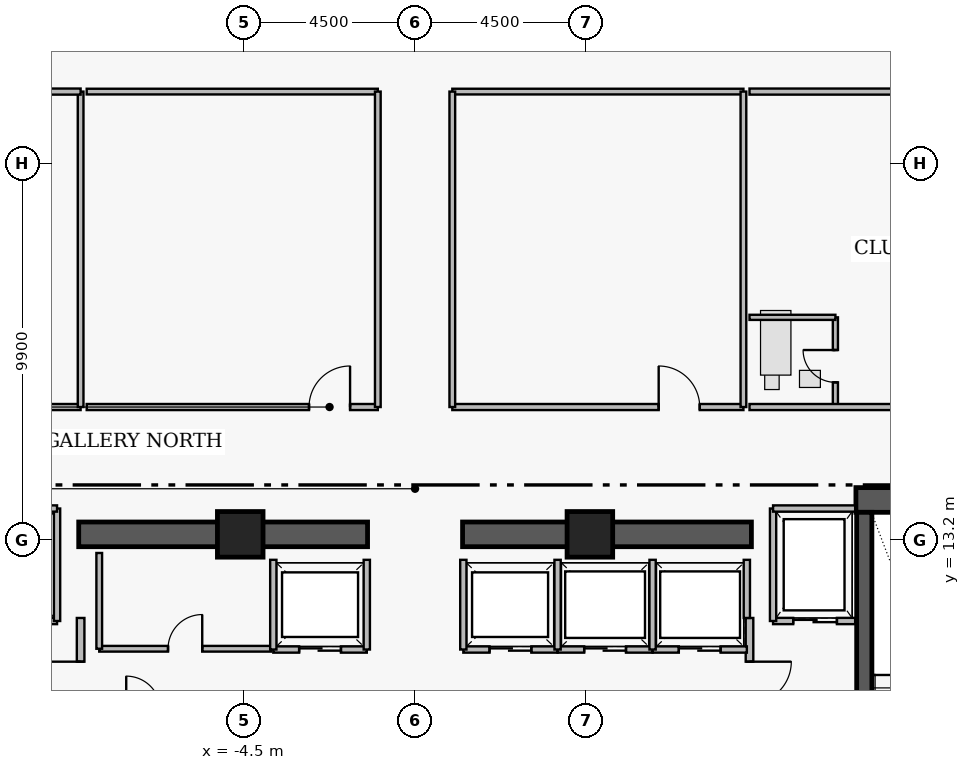
"""IFC4 building model, lengths in metres.
Left out: names, types, materials, properties, quantities, classifications, styles, units other than length and angle.
Written with IfcOpenShell. Run it as: python <this file> out.ifc"""

import sys

from ifc_helpers import new_model, si_unit, direction, frame, frame_2d, origin, origin_2d, place, context, subcontext, project, spatial, rectangle, extrude, element, fill, save


model = new_model("IFC4")
c1 = context("Model", 3, precision=1e-05, world=origin(), true_north=direction((0.0, 1.0)))
c2 = subcontext(c1, "Body", "Model", "MODEL_VIEW")
j1 = project(units=[si_unit("LENGTHUNIT", "METRE"), si_unit("PLANEANGLEUNIT", "RADIAN")], contexts=[c1])
p1 = place(None, origin())
s1 = spatial("IfcSite", under=j1, at=p1, CompositionType="ELEMENT")
p2 = place(p1, origin())
s2 = spatial("IfcBuilding", under=s1, at=p2, CompositionType="ELEMENT")
p3 = place(p2, frame((0.0, 0.0, 226.15)))
s3 = spatial("IfcBuildingStorey", under=s2, at=p3, CompositionType="ELEMENT", Elevation=226.15)
p4 = place(p3, frame((11.6, 14.255, 0.0), z_axis=(0.0, 0.0, 1.0), x_axis=(1.0, 0.0, 0.0)))
e1 = element("IfcWall", 1, at=p4, inside=s3, PredefinedType="SHEAR", context=c2, shape_type="SweptSolid", body=[
    extrude(rectangle(XDim=4.46, YDim=0.65, at=frame_2d((2.23, 0.0))), origin(), (0.0, 0.0, 1.0), 3.56),
])
for number, where, z_axis, x_axis in (
    (2, (-8.85, 13.35, 0.0), (0.0, 0.0, 1.0), (1.0, 0.0, 0.0)),
    (3, (1.25, 13.35, 0.0), (0.0, 0.0, 1.0), (1.0, 0.0, 0.0)),
):
    element("IfcWall", number, at=place(p3, frame(where, z_axis=z_axis, x_axis=x_axis)), inside=s3, PredefinedType="SHEAR", context=c2, shape_type="SweptSolid", body=[
        extrude(rectangle(XDim=7.6, YDim=0.65, at=frame_2d((3.8, 0.0))), origin(), (0.0, 0.0, 1.0), 3.53),
    ])
p5 = place(p3, frame((11.82, 13.93, 0.0), z_axis=(0.0, 0.0, 1.0), x_axis=(0.0, -1.0, 0.0)))
e4 = element("IfcWall", 4, at=p5, inside=s3, PredefinedType="SHEAR", context=c2, shape_type="SweptSolid", body=[
    extrude(rectangle(XDim=8.96, YDim=0.4, at=frame_2d((4.48, 0.0))), origin(), (0.0, 0.0, 1.0), 3.56),
])
p6 = place(p5, frame((7.53, 0.0, 0.0)))
e5 = element("IfcOpeningElement", 5, at=p6, cuts=e4, PredefinedType="OPENING", context=c2, shape_type="SweptSolid", body=[
    extrude(rectangle(XDim=1.12, YDim=2.22, at=frame_2d((0.56, 1.11))), frame((0.0, 0.21, 0.0), z_axis=(0.0, -1.0, 0.0), x_axis=(1.0, 0.0, 0.0)), (0.0, 0.0, 1.0), 0.42),
])
for number, where, z_axis, x_axis in (
    (6, (-4.6, 13.35, 0.0), (0.0, 0.0, 1.0), (1.0, 0.0, 0.0)),
    (7, (4.6, 13.35, 0.0), (0.0, 0.0, 1.0), (1.0, 0.0, 0.0)),
):
    element("IfcColumn", number, at=place(p3, frame(where, z_axis=z_axis, x_axis=x_axis)), inside=s3, PredefinedType="COLUMN", context=c2, shape_type="SweptSolid", body=[
        extrude(rectangle(XDim=1.2, YDim=1.2, at=origin_2d()), origin(), (0.0, 0.0, 1.0), 3.75),
    ])
p7 = place(p3, frame((-8.8, 5.05, 0.0), z_axis=(0.0, 0.0, 1.0), x_axis=(0.0, 1.0, 0.0)))
e8 = element("IfcWall", 8, at=p7, inside=s3, PredefinedType="PARTITIONING", context=c2, shape_type="SweptSolid", body=[
    extrude(rectangle(XDim=6.1, YDim=0.2, at=frame_2d((3.05, 0.0))), origin(), (0.0, 0.0, 1.0), 3.53),
])
p8 = place(p7, frame((0.25, 0.0, 0.0)))
e9 = element("IfcOpeningElement", 9, at=p8, cuts=e8, PredefinedType="OPENING", context=c2, shape_type="SweptSolid", body=[
    extrude(rectangle(XDim=1.1, YDim=2.2, at=frame_2d((0.55, 1.1))), frame((0.0, 0.11, 0.0), z_axis=(0.0, -1.0, 0.0), x_axis=(1.0, 0.0, 0.0)), (0.0, 0.0, 1.0), 0.22),
])
p9 = place(p7, frame((3.85, 0.0, 0.0)))
e10 = element("IfcOpeningElement", 10, at=p9, cuts=e8, PredefinedType="OPENING", context=c2, shape_type="SweptSolid", body=[
    extrude(rectangle(XDim=1.1, YDim=2.2, at=frame_2d((0.55, 1.1))), frame((0.0, 0.11, 0.0), z_axis=(0.0, -1.0, 0.0), x_axis=(1.0, 0.0, 0.0)), (0.0, 0.0, 1.0), 0.22),
])
p10 = place(p3, frame((8.8, 11.15, 0.0), z_axis=(0.0, 0.0, 1.0), x_axis=(0.0, -1.0, 0.0)))
e11 = element("IfcWall", 11, at=p10, inside=s3, PredefinedType="PARTITIONING", context=c2, shape_type="SweptSolid", body=[
    extrude(rectangle(XDim=6.1, YDim=0.2, at=frame_2d((3.05, 0.0))), origin(), (0.0, 0.0, 1.0), 3.53),
])
p11 = place(p10, frame((1.15, 0.0, 0.0)))
e12 = element("IfcOpeningElement", 12, at=p11, cuts=e11, PredefinedType="OPENING", context=c2, shape_type="SweptSolid", body=[
    extrude(rectangle(XDim=1.1, YDim=2.2, at=frame_2d((0.55, 1.1))), frame((0.0, 0.11, 0.0), z_axis=(0.0, -1.0, 0.0), x_axis=(1.0, 0.0, 0.0)), (0.0, 0.0, 1.0), 0.22),
])
p12 = place(p10, frame((4.75, 0.0, 0.0)))
e13 = element("IfcOpeningElement", 13, at=p12, cuts=e11, PredefinedType="OPENING", context=c2, shape_type="SweptSolid", body=[
    extrude(rectangle(XDim=1.1, YDim=2.2, at=frame_2d((0.55, 1.1))), frame((0.0, 0.11, 0.0), z_axis=(0.0, -1.0, 0.0), x_axis=(1.0, 0.0, 0.0)), (0.0, 0.0, 1.0), 0.22),
])
p13 = place(p3, frame((-11.58, 11.07, 0.0), z_axis=(0.0, 0.0, 1.0), x_axis=(1.0, 0.0, 0.0)))
e14 = element("IfcWall", 14, at=p13, inside=s3, PredefinedType="PARTITIONING", context=c2, shape_type="SweptSolid", body=[
    extrude(rectangle(XDim=2.16, YDim=0.165, at=frame_2d((1.08, 0.0))), origin(), (0.0, 0.0, 1.0), 3.53),
])
p14 = place(p13, frame((0.53, 0.0, 0.0)))
e15 = element("IfcOpeningElement", 15, at=p14, cuts=e14, PredefinedType="OPENING", context=c2, shape_type="SweptSolid", body=[
    extrude(rectangle(XDim=1.15, YDim=2.25, at=frame_2d((0.575, 1.125))), frame((0.0, 0.093, 0.0), z_axis=(0.0, -1.0, 0.0), x_axis=(1.0, 0.0, 0.0)), (0.0, 0.0, 1.0), 0.185),
])
p15 = place(p3, frame((9.42, 11.07, 0.0), z_axis=(0.0, 0.0, 1.0), x_axis=(1.0, 0.0, 0.0)))
e16 = element("IfcWall", 16, at=p15, inside=s3, PredefinedType="PARTITIONING", context=c2, shape_type="SweptSolid", body=[
    extrude(rectangle(XDim=2.16, YDim=0.165, at=frame_2d((1.08, 0.0))), origin(), (0.0, 0.0, 1.0), 3.53),
])
p16 = place(p15, frame((0.53, 0.0, 0.0)))
e17 = element("IfcOpeningElement", 17, at=p16, cuts=e16, PredefinedType="OPENING", context=c2, shape_type="SweptSolid", body=[
    extrude(rectangle(XDim=1.15, YDim=2.25, at=frame_2d((0.575, 1.125))), frame((0.0, 0.093, 0.0), z_axis=(0.0, -1.0, 0.0), x_axis=(1.0, 0.0, 0.0)), (0.0, 0.0, 1.0), 0.185),
])
p17 = place(p3, frame((-3.73, 10.32, 0.0), z_axis=(0.0, 0.0, 1.0), x_axis=(1.0, 0.0, 0.0)))
e18 = element("IfcWall", 18, at=p17, inside=s3, PredefinedType="PARTITIONING", context=c2, shape_type="SweptSolid", body=[
    extrude(rectangle(XDim=2.46, YDim=0.165, at=frame_2d((1.23, 0.0))), origin(), (0.0, 0.0, 1.0), 3.53),
])
p18 = place(p17, frame((0.68, 0.0, 0.0)))
e19 = element("IfcOpeningElement", 19, at=p18, cuts=e18, PredefinedType="OPENING", context=c2, shape_type="SweptSolid", body=[
    extrude(rectangle(XDim=1.1, YDim=2.25, at=frame_2d((0.55, 1.125))), frame((0.0, 0.093, 0.0), z_axis=(0.0, -1.0, 0.0), x_axis=(1.0, 0.0, 0.0)), (0.0, 0.0, 1.0), 0.185),
])
p19 = place(p3, frame((1.27, 10.32, 0.0), z_axis=(0.0, 0.0, 1.0), x_axis=(1.0, 0.0, 0.0)))
e20 = element("IfcWall", 20, at=p19, inside=s3, PredefinedType="PARTITIONING", context=c2, shape_type="SweptSolid", body=[
    extrude(rectangle(XDim=2.48, YDim=0.165, at=frame_2d((1.24, 0.0))), origin(), (0.0, 0.0, 1.0), 3.53),
])
p20 = place(p19, frame((0.69, 0.0, 0.0)))
e21 = element("IfcOpeningElement", 21, at=p20, cuts=e20, PredefinedType="OPENING", context=c2, shape_type="SweptSolid", body=[
    extrude(rectangle(XDim=1.1, YDim=2.25, at=frame_2d((0.55, 1.125))), frame((0.0, 0.093, 0.0), z_axis=(0.0, -1.0, 0.0), x_axis=(1.0, 0.0, 0.0)), (0.0, 0.0, 1.0), 0.185),
])
p21 = place(p3, frame((3.75, 10.32, 0.0), z_axis=(0.0, 0.0, 1.0), x_axis=(1.0, 0.0, 0.0)))
e22 = element("IfcWall", 22, at=p21, inside=s3, PredefinedType="PARTITIONING", context=c2, shape_type="SweptSolid", body=[
    extrude(rectangle(XDim=2.5, YDim=0.165, at=frame_2d((1.25, 0.0))), origin(), (0.0, 0.0, 1.0), 3.53),
])
p22 = place(p21, frame((0.7, 0.0, 0.0)))
e23 = element("IfcOpeningElement", 23, at=p22, cuts=e22, PredefinedType="OPENING", context=c2, shape_type="SweptSolid", body=[
    extrude(rectangle(XDim=1.1, YDim=2.25, at=frame_2d((0.55, 1.125))), frame((0.0, 0.093, 0.0), z_axis=(0.0, -1.0, 0.0), x_axis=(1.0, 0.0, 0.0)), (0.0, 0.0, 1.0), 0.185),
])
p23 = place(p3, frame((6.25, 10.32, 0.0), z_axis=(0.0, 0.0, 1.0), x_axis=(1.0, 0.0, 0.0)))
e24 = element("IfcWall", 24, at=p23, inside=s3, PredefinedType="PARTITIONING", context=c2, shape_type="SweptSolid", body=[
    extrude(rectangle(XDim=2.48, YDim=0.165, at=frame_2d((1.24, 0.0))), origin(), (0.0, 0.0, 1.0), 3.53),
])
p24 = place(p23, frame((0.69, 0.0, 0.0)))
e25 = element("IfcOpeningElement", 25, at=p24, cuts=e24, PredefinedType="OPENING", context=c2, shape_type="SweptSolid", body=[
    extrude(rectangle(XDim=1.1, YDim=2.25, at=frame_2d((0.55, 1.125))), frame((0.0, 0.093, 0.0), z_axis=(0.0, -1.0, 0.0), x_axis=(1.0, 0.0, 0.0)), (0.0, 0.0, 1.0), 0.185),
])
p25 = place(p3, frame((-8.31, 10.34, 0.0), z_axis=(0.0, 0.0, 1.0), x_axis=(1.0, 0.0, 0.0)))
e26 = element("IfcWall", 26, at=p25, inside=s3, PredefinedType="PARTITIONING", context=c2, shape_type="SweptSolid", body=[
    extrude(rectangle(XDim=4.52, YDim=0.15, at=frame_2d((2.26, 0.0))), origin(), (0.0, 0.0, 1.0), 3.53),
])
p26 = place(p25, frame((1.81, 0.0, 0.0)))
e27 = element("IfcOpeningElement", 27, at=p26, cuts=e26, PredefinedType="OPENING", context=c2, shape_type="SweptSolid", body=[
    extrude(rectangle(XDim=0.9, YDim=2.15, at=frame_2d((0.45, 1.075))), frame((0.0, 0.085, 0.0), z_axis=(0.0, -1.0, 0.0), x_axis=(1.0, 0.0, 0.0)), (0.0, 0.0, 1.0), 0.17),
])
p27 = place(p3, frame((-22.04, 16.7, 0.0), z_axis=(0.0, 0.0, 1.0), x_axis=(1.0, 0.0, 0.0)))
e28 = element("IfcWall", 28, at=p27, inside=s3, PredefinedType="PARTITIONING", context=c2, shape_type="SweptSolid", body=[
    extrude(rectangle(XDim=13.24, YDim=0.16, at=frame_2d((6.62, 0.0))), origin(), (0.0, 0.0, 1.0), 3.124),
])
p28 = place(p27, frame((7.365, 0.0, 0.0)))
e29 = element("IfcOpeningElement", 29, at=p28, cuts=e28, PredefinedType="OPENING", context=c2, shape_type="SweptSolid", body=[
    extrude(rectangle(XDim=1.0, YDim=2.15, at=frame_2d((0.5, 1.075))), frame((0.0, 0.09, 0.0), z_axis=(0.0, -1.0, 0.0), x_axis=(1.0, 0.0, 0.0)), (0.0, 0.0, 1.0), 0.18),
])
p29 = place(p3, frame((-8.64, 16.7, 0.0), z_axis=(0.0, 0.0, 1.0), x_axis=(1.0, 0.0, 0.0)))
e30 = element("IfcWall", 30, at=p29, inside=s3, PredefinedType="PARTITIONING", context=c2, shape_type="SweptSolid", body=[
    extrude(rectangle(XDim=7.66, YDim=0.16, at=frame_2d((3.83, 0.0))), origin(), (0.0, 0.0, 1.0), 3.124),
])
p30 = place(p29, frame((5.85, 0.0, 0.0)))
e31 = element("IfcOpeningElement", 31, at=p30, cuts=e30, PredefinedType="OPENING", context=c2, shape_type="SweptSolid", body=[
    extrude(rectangle(XDim=1.08, YDim=2.18, at=frame_2d((0.54, 1.09))), frame((0.0, 0.09, 0.0), z_axis=(0.0, -1.0, 0.0), x_axis=(1.0, 0.0, 0.0)), (0.0, 0.0, 1.0), 0.18),
])
p31 = place(p3, frame((0.98, 16.7, 0.0), z_axis=(0.0, 0.0, 1.0), x_axis=(1.0, 0.0, 0.0)))
e32 = element("IfcWall", 32, at=p31, inside=s3, PredefinedType="PARTITIONING", context=c2, shape_type="SweptSolid", body=[
    extrude(rectangle(XDim=7.66, YDim=0.16, at=frame_2d((3.83, 0.0))), origin(), (0.0, 0.0, 1.0), 3.124),
])
p32 = place(p31, frame((5.43, 0.0, 0.0)))
e33 = element("IfcOpeningElement", 33, at=p32, cuts=e32, PredefinedType="OPENING", context=c2, shape_type="SweptSolid", body=[
    extrude(rectangle(XDim=1.08, YDim=2.18, at=frame_2d((0.54, 1.09))), frame((0.0, 0.09, 0.0), z_axis=(0.0, -1.0, 0.0), x_axis=(1.0, 0.0, 0.0)), (0.0, 0.0, 1.0), 0.18),
])
p33 = place(p3, frame((11.06, 16.7, 0.0), z_axis=(0.0, 0.0, 1.0), x_axis=(0.0, 1.0, 0.0)))
e34 = element("IfcWall", 34, at=p33, inside=s3, PredefinedType="PLUMBINGWALL", context=c2, shape_type="SweptSolid", body=[
    extrude(rectangle(XDim=2.36, YDim=0.135, at=frame_2d((1.18, 0.0))), origin(), (0.0, 0.0, 1.0), 3.53),
])
p34 = place(p33, frame((0.65, 0.0, 0.0)))
e35 = element("IfcOpeningElement", 35, at=p34, cuts=e34, PredefinedType="OPENING", context=c2, shape_type="SweptSolid", body=[
    extrude(rectangle(XDim=0.85, YDim=2.1, at=frame_2d((0.425, 1.05))), frame((0.0, 0.077, 0.0), z_axis=(0.0, -1.0, 0.0), x_axis=(1.0, 0.0, 0.0)), (0.0, 0.0, 1.0), 0.155),
])
p35 = place(p3, frame((8.8, 16.7, 0.0), z_axis=(0.0, 0.0, 1.0), x_axis=(1.0, 0.0, 0.0)))
e36 = element("IfcWall", 36, at=p35, inside=s3, PredefinedType="PARTITIONING", context=c2, shape_type="SweptSolid", body=[
    extrude(rectangle(XDim=13.24, YDim=0.16, at=frame_2d((6.62, 0.0))), origin(), (0.0, 0.0, 1.0), 3.124),
])
p36 = place(p35, frame((6.025, 0.0, 0.0)))
e37 = element("IfcOpeningElement", 37, at=p36, cuts=e36, PredefinedType="OPENING", context=c2, shape_type="SweptSolid", body=[
    extrude(rectangle(XDim=1.0, YDim=2.15, at=frame_2d((0.5, 1.075))), frame((0.0, 0.09, 0.0), z_axis=(0.0, -1.0, 0.0), x_axis=(1.0, 0.0, 0.0)), (0.0, 0.0, 1.0), 0.18),
])
p37 = place(p3, frame((-9.42, 11.07, 0.0), z_axis=(0.0, 0.0, 1.0), x_axis=(0.0, 1.0, 0.0)))
e38 = element("IfcWall", 38, at=p37, inside=s3, PredefinedType="PARTITIONING", context=c2, shape_type="SweptSolid", body=[
    extrude(rectangle(XDim=2.96, YDim=0.165, at=frame_2d((1.48, 0.0))), origin(), (0.0, 0.0, 1.0), 3.53),
])
p38 = place(p3, frame((-11.58, 14.03, 0.0), z_axis=(0.0, 0.0, 1.0), x_axis=(1.0, 0.0, 0.0)))
e39 = element("IfcWall", 39, at=p38, inside=s3, PredefinedType="PARTITIONING", context=c2, shape_type="SweptSolid", body=[
    extrude(rectangle(XDim=2.16, YDim=0.165, at=frame_2d((1.08, 0.0))), origin(), (0.0, 0.0, 1.0), 3.53),
])
p39 = place(p3, frame((9.42, 11.07, 0.0), z_axis=(0.0, 0.0, 1.0), x_axis=(0.0, 1.0, 0.0)))
e40 = element("IfcWall", 40, at=p39, inside=s3, PredefinedType="PARTITIONING", context=c2, shape_type="SweptSolid", body=[
    extrude(rectangle(XDim=2.96, YDim=0.165, at=frame_2d((1.48, 0.0))), origin(), (0.0, 0.0, 1.0), 3.53),
])
p40 = place(p3, frame((9.42, 14.03, 0.0), z_axis=(0.0, 0.0, 1.0), x_axis=(1.0, 0.0, 0.0)))
e41 = element("IfcWall", 41, at=p40, inside=s3, PredefinedType="PARTITIONING", context=c2, shape_type="SweptSolid", body=[
    extrude(rectangle(XDim=2.16, YDim=0.165, at=frame_2d((1.08, 0.0))), origin(), (0.0, 0.0, 1.0), 3.53),
])
for number, where, z_axis, x_axis in (
    (42, (-3.73, 10.32, 0.0), (0.0, 0.0, 1.0), (0.0, 1.0, 0.0)),
    (43, (-1.27, 10.32, 0.0), (0.0, 0.0, 1.0), (0.0, 1.0, 0.0)),
    (44, (1.27, 10.32, 0.0), (0.0, 0.0, 1.0), (0.0, 1.0, 0.0)),
    (45, (3.75, 10.32, 0.0), (0.0, 0.0, 1.0), (0.0, 1.0, 0.0)),
    (46, (6.25, 10.32, 0.0), (0.0, 0.0, 1.0), (0.0, 1.0, 0.0)),
):
    element("IfcWall", number, at=place(p3, frame(where, z_axis=z_axis, x_axis=x_axis)), inside=s3, PredefinedType="PARTITIONING", context=c2, shape_type="SweptSolid", body=[
        extrude(rectangle(XDim=2.36, YDim=0.165, at=frame_2d((1.18, 0.0))), origin(), (0.0, 0.0, 1.0), 3.53),
    ])
p41 = place(p3, frame((8.73, 11.15, 0.0), z_axis=(0.0, 0.0, 1.0), x_axis=(0.0, 1.0, 0.0)))
e47 = element("IfcWall", 47, at=p41, inside=s3, PredefinedType="PARTITIONING", context=c2, shape_type="SweptSolid", body=[
    extrude(rectangle(XDim=1.53, YDim=0.165, at=frame_2d((0.765, 0.0))), origin(), (0.0, 0.0, 1.0), 3.53),
])
p42 = place(p3, frame((-8.31, 10.34, 0.0), z_axis=(0.0, 0.0, 1.0), x_axis=(0.0, 1.0, 0.0)))
e48 = element("IfcWall", 48, at=p42, inside=s3, PredefinedType="PARTITIONING", context=c2, shape_type="SweptSolid", body=[
    extrude(rectangle(XDim=2.52, YDim=0.15, at=frame_2d((1.26, 0.0))), origin(), (0.0, 0.0, 1.0), 3.53),
])
p43 = place(p3, frame((-8.8, 16.7, 0.0), z_axis=(0.0, 0.0, 1.0), x_axis=(0.0, 1.0, 0.0)))
e49 = element("IfcWall", 49, at=p43, inside=s3, PredefinedType="PARTITIONING", context=c2, shape_type="SweptSolid", body=[
    extrude(rectangle(XDim=8.3, YDim=0.15, at=frame_2d((4.15, 0.0))), origin(), (0.0, 0.0, 1.0), 3.53),
])
p44 = place(p3, frame((-22.04, 25.0, 0.0), z_axis=(0.0, 0.0, 1.0), x_axis=(1.0, 0.0, 0.0)))
e50 = element("IfcWall", 50, at=p44, inside=s3, PredefinedType="PARTITIONING", context=c2, shape_type="SweptSolid", body=[
    extrude(rectangle(XDim=13.24, YDim=0.16, at=frame_2d((6.62, 0.0))), origin(), (0.0, 0.0, 1.0), 3.124),
])
p45 = place(p3, frame((-8.64, 25.0, 0.0), z_axis=(0.0, 0.0, 1.0), x_axis=(1.0, 0.0, 0.0)))
e51 = element("IfcWall", 51, at=p45, inside=s3, PredefinedType="PARTITIONING", context=c2, shape_type="SweptSolid", body=[
    extrude(rectangle(XDim=7.66, YDim=0.15, at=frame_2d((3.83, 0.0))), origin(), (0.0, 0.0, 1.0), 3.124),
])
p46 = place(p3, frame((-0.98, 16.7, 0.0), z_axis=(0.0, 0.0, 1.0), x_axis=(0.0, 1.0, 0.0)))
e52 = element("IfcWall", 52, at=p46, inside=s3, PredefinedType="PARTITIONING", context=c2, shape_type="SweptSolid", body=[
    extrude(rectangle(XDim=8.3, YDim=0.15, at=frame_2d((4.15, 0.0))), origin(), (0.0, 0.0, 1.0), 3.53),
])
p47 = place(p3, frame((0.98, 25.0, 0.0), z_axis=(0.0, 0.0, 1.0), x_axis=(1.0, 0.0, 0.0)))
e53 = element("IfcWall", 53, at=p47, inside=s3, PredefinedType="PARTITIONING", context=c2, shape_type="SweptSolid", body=[
    extrude(rectangle(XDim=7.66, YDim=0.15, at=frame_2d((3.83, 0.0))), origin(), (0.0, 0.0, 1.0), 3.124),
])
for number, where, z_axis, x_axis in (
    (54, (0.98, 16.7, 0.0), (0.0, 0.0, 1.0), (0.0, 1.0, 0.0)),
    (55, (8.64, 16.7, 0.0), (0.0, 0.0, 1.0), (0.0, 1.0, 0.0)),
):
    element("IfcWall", number, at=place(p3, frame(where, z_axis=z_axis, x_axis=x_axis)), inside=s3, PredefinedType="PARTITIONING", context=c2, shape_type="SweptSolid", body=[
        extrude(rectangle(XDim=8.3, YDim=0.15, at=frame_2d((4.15, 0.0))), origin(), (0.0, 0.0, 1.0), 3.53),
    ])
p48 = place(p3, frame((8.8, 19.06, 0.0), z_axis=(0.0, 0.0, 1.0), x_axis=(1.0, 0.0, 0.0)))
e56 = element("IfcWall", 56, at=p48, inside=s3, PredefinedType="PLUMBINGWALL", context=c2, shape_type="SweptSolid", body=[
    extrude(rectangle(XDim=2.26, YDim=0.135, at=frame_2d((1.13, 0.0))), origin(), (0.0, 0.0, 1.0), 3.124),
])
p49 = place(p3, frame((8.8, 25.0, 0.0), z_axis=(0.0, 0.0, 1.0), x_axis=(1.0, 0.0, 0.0)))
e57 = element("IfcWall", 57, at=p49, inside=s3, PredefinedType="PARTITIONING", context=c2, shape_type="SweptSolid", body=[
    extrude(rectangle(XDim=13.24, YDim=0.16, at=frame_2d((6.62, 0.0))), origin(), (0.0, 0.0, 1.0), 3.124),
])
p50 = place(p9, origin())
e58 = element("IfcDoor", 58, at=p50, inside=s3, OperationType="SINGLE_SWING_RIGHT", PredefinedType="DOOR", context=c2, shape_type="SweptSolid", body=[
    extrude(rectangle(XDim=1.1, YDim=2.2, at=frame_2d((0.55, 1.1))), frame((0.0, 0.025, 0.0), z_axis=(0.0, -1.0, 0.0), x_axis=(1.0, 0.0, 0.0)), (0.0, 0.0, 1.0), 0.05),
])
fill(e10, e58)
p51 = place(p11, origin())
e59 = element("IfcDoor", 59, at=p51, inside=s3, OperationType="SINGLE_SWING_LEFT", PredefinedType="DOOR", context=c2, shape_type="SweptSolid", body=[
    extrude(rectangle(XDim=1.1, YDim=2.2, at=frame_2d((0.55, 1.1))), frame((0.0, 0.025, 0.0), z_axis=(0.0, -1.0, 0.0), x_axis=(1.0, 0.0, 0.0)), (0.0, 0.0, 1.0), 0.05),
])
fill(e12, e59)
p52 = place(p16, origin())
e60 = element("IfcDoor", 60, at=p52, inside=s3, OperationType="SLIDING_TO_LEFT", PredefinedType="DOOR", context=c2, shape_type="SweptSolid", body=[
    extrude(rectangle(XDim=1.15, YDim=2.25, at=frame_2d((0.575, 1.125))), frame((0.0, 0.025, 0.0), z_axis=(0.0, -1.0, 0.0), x_axis=(1.0, 0.0, 0.0)), (0.0, 0.0, 1.0), 0.05),
])
fill(e17, e60)
p53 = place(p18, origin())
e61 = element("IfcDoor", 61, at=p53, inside=s3, OperationType="SLIDING_TO_LEFT", PredefinedType="DOOR", context=c2, shape_type="SweptSolid", body=[
    extrude(rectangle(XDim=1.1, YDim=2.25, at=frame_2d((0.55, 1.125))), frame((0.0, 0.025, 0.0), z_axis=(0.0, -1.0, 0.0), x_axis=(1.0, 0.0, 0.0)), (0.0, 0.0, 1.0), 0.05),
])
fill(e19, e61)
p54 = place(p20, origin())
e62 = element("IfcDoor", 62, at=p54, inside=s3, OperationType="SLIDING_TO_LEFT", PredefinedType="DOOR", context=c2, shape_type="SweptSolid", body=[
    extrude(rectangle(XDim=1.1, YDim=2.25, at=frame_2d((0.55, 1.125))), frame((0.0, 0.025, 0.0), z_axis=(0.0, -1.0, 0.0), x_axis=(1.0, 0.0, 0.0)), (0.0, 0.0, 1.0), 0.05),
])
fill(e21, e62)
p55 = place(p22, origin())
e63 = element("IfcDoor", 63, at=p55, inside=s3, OperationType="SLIDING_TO_LEFT", PredefinedType="DOOR", context=c2, shape_type="SweptSolid", body=[
    extrude(rectangle(XDim=1.1, YDim=2.25, at=frame_2d((0.55, 1.125))), frame((0.0, 0.025, 0.0), z_axis=(0.0, -1.0, 0.0), x_axis=(1.0, 0.0, 0.0)), (0.0, 0.0, 1.0), 0.05),
])
fill(e23, e63)
p56 = place(p24, origin())
e64 = element("IfcDoor", 64, at=p56, inside=s3, OperationType="SLIDING_TO_LEFT", PredefinedType="DOOR", context=c2, shape_type="SweptSolid", body=[
    extrude(rectangle(XDim=1.1, YDim=2.25, at=frame_2d((0.55, 1.125))), frame((0.0, 0.025, 0.0), z_axis=(0.0, -1.0, 0.0), x_axis=(1.0, 0.0, 0.0)), (0.0, 0.0, 1.0), 0.05),
])
fill(e25, e64)
p57 = place(p26, origin())
e65 = element("IfcDoor", 65, at=p57, inside=s3, OperationType="SINGLE_SWING_RIGHT", PredefinedType="DOOR", context=c2, shape_type="SweptSolid", body=[
    extrude(rectangle(XDim=0.9, YDim=2.15, at=frame_2d((0.45, 1.075))), frame((0.0, 0.025, 0.0), z_axis=(0.0, -1.0, 0.0), x_axis=(1.0, 0.0, 0.0)), (0.0, 0.0, 1.0), 0.05),
])
fill(e27, e65)
p58 = place(p30, origin())
e66 = element("IfcDoor", 66, at=p58, inside=s3, OperationType="SINGLE_SWING_RIGHT", PredefinedType="DOOR", context=c2, shape_type="SweptSolid", body=[
    extrude(rectangle(XDim=1.08, YDim=2.18, at=frame_2d((0.54, 1.09))), frame((0.0, 0.025, 0.0), z_axis=(0.0, -1.0, 0.0), x_axis=(1.0, 0.0, 0.0)), (0.0, 0.0, 1.0), 0.05),
])
fill(e31, e66)
p59 = place(p32, origin())
e67 = element("IfcDoor", 67, at=p59, inside=s3, OperationType="SINGLE_SWING_LEFT", PredefinedType="DOOR", context=c2, shape_type="SweptSolid", body=[
    extrude(rectangle(XDim=1.08, YDim=2.18, at=frame_2d((0.54, 1.09))), frame((0.0, 0.025, 0.0), z_axis=(0.0, -1.0, 0.0), x_axis=(1.0, 0.0, 0.0)), (0.0, 0.0, 1.0), 0.05),
])
fill(e33, e67)
p60 = place(p34, origin())
e68 = element("IfcDoor", 68, at=p60, inside=s3, OperationType="SINGLE_SWING_RIGHT", PredefinedType="DOOR", context=c2, shape_type="SweptSolid", body=[
    extrude(rectangle(XDim=0.85, YDim=2.1, at=frame_2d((0.425, 1.05))), frame((0.0, 0.025, 0.0), z_axis=(0.0, -1.0, 0.0), x_axis=(1.0, 0.0, 0.0)), (0.0, 0.0, 1.0), 0.05),
])
fill(e35, e68)
save(model, sys.argv[1])
